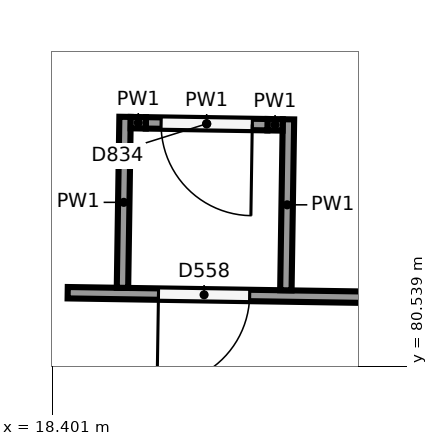
"""IFC4 building model, lengths in metres.
Left out: names, types, materials, properties, quantities, classifications, styles, units other than length and angle.
Written with IfcOpenShell. Run it as: python <this file> out.ifc"""

import sys

from ifc_helpers import new_model, si_unit, direction, frame, frame_2d, origin, place, context, subcontext, project, spatial, rectangle, extrude, element, fill, save


model = new_model("IFC4")
c1 = context("Model", 3, precision=1e-05, world=origin(), true_north=direction((0.0, 1.0)))
c2 = subcontext(c1, "Body", "Model", "MODEL_VIEW")
j1 = project(units=[si_unit("LENGTHUNIT", "METRE"), si_unit("PLANEANGLEUNIT", "RADIAN")], contexts=[c1])
p1 = place(None, origin())
s1 = spatial("IfcSite", under=j1, at=p1, CompositionType="ELEMENT")
p2 = place(p1, origin())
s2 = spatial("IfcBuilding", under=s1, at=p2, CompositionType="ELEMENT")
p3 = place(p2, origin())
s3 = spatial("IfcBuildingStorey", under=s2, at=p3, CompositionType="ELEMENT", Elevation=0.0)
p4 = place(p3, frame((27.699, 81.37, 0.0), z_axis=(0.0, 0.0, 1.0), x_axis=(-0.999884976641, 0.015166854913, 0.0)))
e1 = element("IfcWall", 1, at=p4, inside=s3, PredefinedType="PARTITIONING", context=c2, shape_type="SweptSolid", body=[
    extrude(rectangle(XDim=9.095, YDim=0.15, at=frame_2d((4.547, 0.0))), origin(), (0.0, 0.0, 1.0), 6.15),
])
p5 = place(p4, frame((6.7, 0.0, 0.0)))
e2 = element("IfcOpeningElement", 2, at=p5, cuts=e1, PredefinedType="OPENING", context=c2, shape_type="SweptSolid", body=[
    extrude(rectangle(XDim=1.2, YDim=2.1, at=frame_2d((0.6, 1.05))), frame((0.0, 0.085, 0.0), z_axis=(0.0, -1.0, 0.0), x_axis=(1.0, 0.0, 0.0)), (0.0, 0.0, 1.0), 0.17),
])
p6 = place(p3, frame((21.476, 81.539, 0.0), z_axis=(0.0, 0.0, 1.0), x_axis=(0.015190867683, 0.999884612112, 0.0)))
e3 = element("IfcWall", 3, at=p6, inside=s3, PredefinedType="PARTITIONING", context=c2, shape_type="SweptSolid", body=[
    extrude(rectangle(XDim=2.25, YDim=0.15, at=frame_2d((1.125, 0.0))), origin(), (0.0, 0.0, 1.0), 6.15),
])
p7 = place(p3, frame((19.326, 81.572, 0.0), z_axis=(0.0, 0.0, 1.0), x_axis=(0.015084022783, 0.999886229656, 0.0)))
e4 = element("IfcWall", 4, at=p7, inside=s3, PredefinedType="PARTITIONING", context=c2, shape_type="SweptSolid", body=[
    extrude(rectangle(XDim=2.25, YDim=0.15, at=frame_2d((1.125, 0.0))), origin(), (0.0, 0.0, 1.0), 6.15),
])
p8 = place(p3, frame((21.434, 83.715, 0.0), z_axis=(0.0, 0.0, 1.0), x_axis=(-0.999874047484, 0.015871016627, 0.0)))
e5 = element("IfcWall", 5, at=p8, inside=s3, PredefinedType="PARTITIONING", context=c2, shape_type="SweptSolid", body=[
    extrude(rectangle(XDim=0.2, YDim=0.15, at=frame_2d((0.1, 0.0))), origin(), (0.0, 0.0, 1.0), 6.15),
])
p9 = place(p3, frame((21.234, 83.718, 0.0), z_axis=(0.0, 0.0, 1.0), x_axis=(-0.999885899979, 0.015105860537, 0.0)))
e6 = element("IfcWall", 6, at=p9, inside=s3, PredefinedType="PARTITIONING", context=c2, shape_type="SweptSolid", body=[
    extrude(rectangle(XDim=1.6, YDim=0.15, at=frame_2d((0.8, 0.0))), origin(), (0.0, 0.0, 1.0), 6.15),
])
p10 = place(p9, frame((0.2, 0.0, 0.0)))
e7 = element("IfcOpeningElement", 7, at=p10, cuts=e6, PredefinedType="OPENING", context=c2, shape_type="SweptSolid", body=[
    extrude(rectangle(XDim=1.2, YDim=2.1, at=frame_2d((0.6, 1.05))), frame((0.0, 0.085, 0.0), z_axis=(0.0, -1.0, 0.0), x_axis=(1.0, 0.0, 0.0)), (0.0, 0.0, 1.0), 0.17),
])
p11 = place(p3, frame((19.634, 83.742, 0.0), z_axis=(0.0, 0.0, 1.0), x_axis=(-0.999874047484, 0.015871016627, 0.0)))
e8 = element("IfcWall", 8, at=p11, inside=s3, PredefinedType="PARTITIONING", context=c2, shape_type="SweptSolid", body=[
    extrude(rectangle(XDim=0.2, YDim=0.15, at=frame_2d((0.1, 0.0))), origin(), (0.0, 0.0, 1.0), 6.15),
])
p12 = place(p5, origin())
e9 = element("IfcDoor", 9, at=p12, inside=s3, OperationType="SINGLE_SWING_RIGHT", PredefinedType="DOOR", context=c2, shape_type="SweptSolid", body=[
    extrude(rectangle(XDim=1.2, YDim=2.1, at=frame_2d((0.6, 1.05))), frame((0.0, 0.025, 0.0), z_axis=(0.0, -1.0, 0.0), x_axis=(1.0, 0.0, 0.0)), (0.0, 0.0, 1.0), 0.05),
])
fill(e2, e9)
p13 = place(p10, origin())
e10 = element("IfcDoor", 10, at=p13, inside=s3, OperationType="SINGLE_SWING_LEFT", PredefinedType="DOOR", context=c2, shape_type="SweptSolid", body=[
    extrude(rectangle(XDim=1.2, YDim=2.1, at=frame_2d((0.6, 1.05))), frame((0.0, 0.025, 0.0), z_axis=(0.0, -1.0, 0.0), x_axis=(1.0, 0.0, 0.0)), (0.0, 0.0, 1.0), 0.05),
])
fill(e7, e10)
save(model, sys.argv[1])
